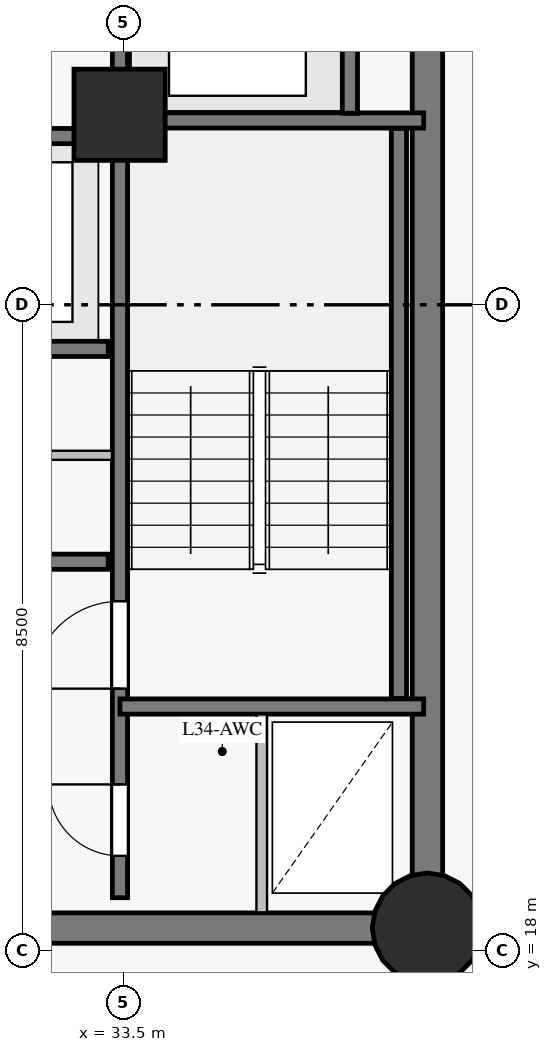
"""IFC4 building model, lengths in metres.
Left out: names, types, materials, properties, quantities, classifications, styles, units other than length and angle.
Written with IfcOpenShell. Run it as: python <this file> out.ifc"""

import sys

from ifc_helpers import new_model, si_unit, direction, frame, frame_2d, origin, origin_with_axes, origin_2d, place, context, subcontext, project, spatial, rectangle, circle, extrude, source, transform, mapped, element, fill, save


model = new_model("IFC4")
c1 = context("Model", 3, precision=1e-05, world=origin(), true_north=direction((0.0, 1.0)))
c2 = subcontext(c1, "Body", "Model", "MODEL_VIEW")
j1 = project(units=[si_unit("LENGTHUNIT", "METRE"), si_unit("PLANEANGLEUNIT", "RADIAN")], contexts=[c1])
p1 = place(None, origin())
s1 = spatial("IfcSite", under=j1, at=p1, CompositionType="ELEMENT")
p2 = place(p1, origin())
s2 = spatial("IfcBuilding", under=s1, at=p2, CompositionType="ELEMENT")
p3 = place(p2, frame((0.0, 0.0, 123.65)))
s3 = spatial("IfcBuildingStorey", under=s2, at=p3, CompositionType="ELEMENT", Elevation=123.65)
p4 = place(p3, frame((26.55, 18.3, 0.0), z_axis=(0.0, 0.0, 1.0), x_axis=(1.0, 0.0, 0.0)))
e1 = element("IfcWall", 1, at=p4, inside=s3, PredefinedType="SHEAR", context=c2, shape_type="SweptSolid", body=[
    extrude(rectangle(XDim=10.95, YDim=0.4, at=frame_2d((5.475, 0.0))), origin(), (0.0, 0.0, 1.0), 2.825),
])
p5 = place(p4, frame((4.55, 0.0, 0.0)))
e2 = element("IfcOpeningElement", 2, at=p5, cuts=e1, PredefinedType="OPENING", context=c2, shape_type="SweptSolid", body=[
    extrude(rectangle(XDim=1.4, YDim=2.2, at=frame_2d((0.7, 1.1))), frame((0.0, 0.21, 0.0), z_axis=(0.0, -1.0, 0.0), x_axis=(1.0, 0.0, 0.0)), (0.0, 0.0, 1.0), 0.42),
])
p6 = place(p3, frame((37.5, 18.3, 0.0), z_axis=(0.0, 0.0, 1.0), x_axis=(0.0, 1.0, 0.0)))
e3 = element("IfcWall", 3, at=p6, inside=s3, PredefinedType="SHEAR", context=c2, shape_type="SweptSolid", body=[
    extrude(rectangle(XDim=16.4, YDim=0.4, at=frame_2d((8.2, 0.0))), origin(), (0.0, 0.0, 1.0), 2.825),
])
p7 = place(p6, frame((14.15, 0.0, 0.0)))
e4 = element("IfcOpeningElement", 4, at=p7, cuts=e3, PredefinedType="OPENING", context=c2, shape_type="SweptSolid", body=[
    extrude(rectangle(XDim=1.2, YDim=2.15, at=frame_2d((0.6, 1.075))), frame((0.0, 0.21, 0.0), z_axis=(0.0, -1.0, 0.0), x_axis=(1.0, 0.0, 0.0)), (0.0, 0.0, 1.0), 0.42),
])
m1 = source(origin_with_axes(), c2, "Body", "SweptSolid", [
    extrude(circle(Radius=0.725, at=origin_2d()), origin(), (0.0, 0.0, 1.0), 3.05),
])
p8 = place(p3, frame((37.5, 18.3, 0.0), z_axis=(0.0, 0.0, 1.0), x_axis=(1.0, 0.0, 0.0)))
e5 = element("IfcColumn", 5, at=p8, inside=s3, PredefinedType="COLUMN", context=c2, shape_type="MappedRepresentation", body=[
    mapped(m1, transform((0.0, 0.0, 0.0), scale=1.0)),
])
m2 = source(origin_with_axes(), c2, "Body", "SweptSolid", [
    extrude(rectangle(XDim=1.2, YDim=1.2, at=origin_2d()), origin(), (0.0, 0.0, 1.0), 3.05),
])
p9 = place(p3, frame((33.45, 29.0, 0.0), z_axis=(0.0, 0.0, 1.0), x_axis=(1.0, 0.0, 0.0)))
e6 = element("IfcColumn", 6, at=p9, inside=s3, PredefinedType="COLUMN", context=c2, shape_type="MappedRepresentation", body=[
    mapped(m2, transform((0.0, 0.0, 0.0), scale=1.0)),
])
p10 = place(p3, frame((33.455, 18.7, 0.0), z_axis=(0.0, 0.0, 1.0), x_axis=(0.0, 1.0, 0.0)))
e7 = element("IfcWall", 7, at=p10, inside=s3, PredefinedType="SHEAR", context=c2, shape_type="SweptSolid", body=[
    extrude(rectangle(XDim=15.6, YDim=0.2, at=frame_2d((7.8, 0.0))), origin(), (0.0, 0.0, 1.0), 2.825),
])
p11 = place(p10, frame((2.75, 0.0, 0.0)))
e8 = element("IfcOpeningElement", 8, at=p11, cuts=e7, PredefinedType="OPENING", context=c2, shape_type="SweptSolid", body=[
    extrude(rectangle(XDim=1.15, YDim=2.15, at=frame_2d((0.575, 1.075))), frame((0.0, 0.11, 0.0), z_axis=(0.0, -1.0, 0.0), x_axis=(1.0, 0.0, 0.0)), (0.0, 0.0, 1.0), 0.22),
])
p12 = place(p10, frame((0.55, 0.0, 0.0)))
e9 = element("IfcOpeningElement", 9, at=p12, cuts=e7, PredefinedType="OPENING", context=c2, shape_type="SweptSolid", body=[
    extrude(rectangle(XDim=0.94, YDim=2.1, at=frame_2d((0.47, 1.05))), frame((0.0, 0.11, 0.0), z_axis=(0.0, -1.0, 0.0), x_axis=(1.0, 0.0, 0.0)), (0.0, 0.0, 1.0), 0.22),
])
p13 = place(p3, frame((23.7, 23.12, 0.0), z_axis=(0.0, 0.0, 1.0), x_axis=(1.0, 0.0, 0.0)))
e10 = element("IfcWall", 10, at=p13, inside=s3, PredefinedType="SHEAR", context=c2, shape_type="SweptSolid", body=[
    extrude(rectangle(XDim=9.6, YDim=0.2, at=frame_2d((4.8, 0.0))), origin(), (0.0, 0.0, 1.0), 2.825),
])
p14 = place(p13, frame((2.4, 0.0, 0.0)))
e11 = element("IfcOpeningElement", 11, at=p14, cuts=e10, PredefinedType="OPENING", context=c2, shape_type="SweptSolid", body=[
    extrude(rectangle(XDim=1.0, YDim=2.15, at=frame_2d((0.5, 1.075))), frame((0.0, 0.11, 0.0), z_axis=(0.0, -1.0, 0.0), x_axis=(1.0, 0.0, 0.0)), (0.0, 0.0, 1.0), 0.22),
])
p15 = place(p3, frame((23.7, 25.92, 0.0), z_axis=(0.0, 0.0, 1.0), x_axis=(1.0, 0.0, 0.0)))
e12 = element("IfcWall", 12, at=p15, inside=s3, PredefinedType="SHEAR", context=c2, shape_type="SweptSolid", body=[
    extrude(rectangle(XDim=9.6, YDim=0.2, at=frame_2d((4.8, 0.0))), origin(), (0.0, 0.0, 1.0), 2.825),
])
p16 = place(p3, frame((23.7, 28.72, 0.0), z_axis=(0.0, 0.0, 1.0), x_axis=(1.0, 0.0, 0.0)))
e13 = element("IfcWall", 13, at=p16, inside=s3, PredefinedType="SHEAR", context=c2, shape_type="SweptSolid", body=[
    extrude(rectangle(XDim=9.6, YDim=0.2, at=frame_2d((4.8, 0.0))), origin(), (0.0, 0.0, 1.0), 2.825),
])
p17 = place(p16, frame((0.6, 0.0, 0.0)))
e14 = element("IfcOpeningElement", 14, at=p17, cuts=e13, PredefinedType="OPENING", context=c2, shape_type="SweptSolid", body=[
    extrude(rectangle(XDim=1.1, YDim=2.15, at=frame_2d((0.55, 1.075))), frame((0.0, 0.11, 0.0), z_axis=(0.0, -1.0, 0.0), x_axis=(1.0, 0.0, 0.0)), (0.0, 0.0, 1.0), 0.22),
])
p18 = place(p16, frame((2.98, 0.0, 0.0)))
e15 = element("IfcOpeningElement", 15, at=p18, cuts=e13, PredefinedType="OPENING", context=c2, shape_type="SweptSolid", body=[
    extrude(rectangle(XDim=1.1, YDim=2.15, at=frame_2d((0.55, 1.075))), frame((0.0, 0.11, 0.0), z_axis=(0.0, -1.0, 0.0), x_axis=(1.0, 0.0, 0.0)), (0.0, 0.0, 1.0), 0.22),
])
p19 = place(p16, frame((5.36, 0.0, 0.0)))
e16 = element("IfcOpeningElement", 16, at=p19, cuts=e13, PredefinedType="OPENING", context=c2, shape_type="SweptSolid", body=[
    extrude(rectangle(XDim=1.1, YDim=2.15, at=frame_2d((0.55, 1.075))), frame((0.0, 0.11, 0.0), z_axis=(0.0, -1.0, 0.0), x_axis=(1.0, 0.0, 0.0)), (0.0, 0.0, 1.0), 0.22),
])
p20 = place(p16, frame((7.74, 0.0, 0.0)))
e17 = element("IfcOpeningElement", 17, at=p20, cuts=e13, PredefinedType="OPENING", context=c2, shape_type="SweptSolid", body=[
    extrude(rectangle(XDim=1.1, YDim=2.15, at=frame_2d((0.55, 1.075))), frame((0.0, 0.11, 0.0), z_axis=(0.0, -1.0, 0.0), x_axis=(1.0, 0.0, 0.0)), (0.0, 0.0, 1.0), 0.22),
])
p21 = place(p3, frame((37.125, 21.32, 0.0), z_axis=(0.0, 0.0, 1.0), x_axis=(0.0, 1.0, 0.0)))
e18 = element("IfcWall", 18, at=p21, inside=s3, PredefinedType="SHEAR", context=c2, shape_type="SweptSolid", body=[
    extrude(rectangle(XDim=7.5, YDim=0.2, at=frame_2d((3.75, 0.0))), origin(), (0.0, 0.0, 1.0), 2.825),
])
for number, where, z_axis, x_axis in (
    (19, (33.455, 21.215, 0.0), (0.0, 0.0, 1.0), (1.0, 0.0, 0.0)),
    (20, (33.455, 28.925, 0.0), (0.0, 0.0, 1.0), (1.0, 0.0, 0.0)),
):
    element("IfcWall", number, at=place(p3, frame(where, z_axis=z_axis, x_axis=x_axis)), inside=s3, PredefinedType="SHEAR", context=c2, shape_type="SweptSolid", body=[
        extrude(rectangle(XDim=3.995, YDim=0.2, at=frame_2d((1.998, 0.0))), origin(), (0.0, 0.0, 1.0), 2.825),
    ])
p22 = place(p3, frame((36.48, 29.02, 0.0), z_axis=(0.0, 0.0, 1.0), x_axis=(0.0, 1.0, 0.0)))
e21 = element("IfcWall", 21, at=p22, inside=s3, PredefinedType="SHEAR", context=c2, shape_type="SweptSolid", body=[
    extrude(rectangle(XDim=2.86, YDim=0.2, at=frame_2d((1.43, 0.0))), origin(), (0.0, 0.0, 1.0), 2.825),
])
p23 = place(p3, frame((23.652, 24.52, 0.0), z_axis=(0.0, 0.0, 1.0), x_axis=(1.0, 0.0, 0.0)))
e22 = element("IfcWall", 22, at=p23, inside=s3, PredefinedType="PARTITIONING", context=c2, shape_type="SweptSolid", body=[
    extrude(rectangle(XDim=9.698, YDim=0.12, at=frame_2d((4.849, 0.0))), origin(), (0.0, 0.0, 1.0), 2.825),
])
p24 = place(p23, frame((4.2, 0.0, 0.0)))
e23 = element("IfcOpeningElement", 23, at=p24, cuts=e22, PredefinedType="OPENING", context=c2, shape_type="SweptSolid", body=[
    extrude(rectangle(XDim=0.94, YDim=2.1, at=frame_2d((0.47, 1.05))), frame((0.0, 0.07, 0.0), z_axis=(0.0, -1.0, 0.0), x_axis=(1.0, 0.0, 0.0)), (0.0, 0.0, 1.0), 0.14),
])
p25 = place(p3, frame((35.32, 18.507, 0.0), z_axis=(0.0, 0.0, 1.0), x_axis=(0.0, 1.0, 0.0)))
e24 = element("IfcWall", 24, at=p25, inside=s3, PredefinedType="PARTITIONING", context=c2, shape_type="SweptSolid", body=[
    extrude(rectangle(XDim=2.604, YDim=0.14, at=frame_2d((1.302, 0.0))), origin(), (0.0, 0.0, 1.0), 2.825),
])
m3 = source(origin_with_axes(), c2, "Body", "SweptSolid", [
    extrude(rectangle(XDim=1.15, YDim=2.15, at=frame_2d((0.575, 1.075))), frame((0.0, 0.025, 0.0), z_axis=(0.0, -1.0, 0.0), x_axis=(1.0, 0.0, 0.0)), (0.0, 0.0, 1.0), 0.05),
])
p26 = place(p11, origin())
e25 = element("IfcDoor", 25, at=p26, inside=s3, OperationType="SINGLE_SWING_LEFT", PredefinedType="DOOR", context=c2, shape_type="MappedRepresentation", body=[
    mapped(m3, transform((0.0, 0.0, 0.0), scale=1.0)),
])
fill(e8, e25)
m4 = source(origin_with_axes(), c2, "Body", "SweptSolid", [
    extrude(rectangle(XDim=0.94, YDim=2.1, at=frame_2d((0.47, 1.05))), frame((0.0, 0.025, 0.0), z_axis=(0.0, -1.0, 0.0), x_axis=(1.0, 0.0, 0.0)), (0.0, 0.0, 1.0), 0.05),
])
p27 = place(p12, origin())
e26 = element("IfcDoor", 26, at=p27, inside=s3, OperationType="SINGLE_SWING_RIGHT", PredefinedType="DOOR", context=c2, shape_type="MappedRepresentation", body=[
    mapped(m4, transform((0.0, 0.0, 0.0), scale=1.0)),
])
fill(e9, e26)
save(model, sys.argv[1])
